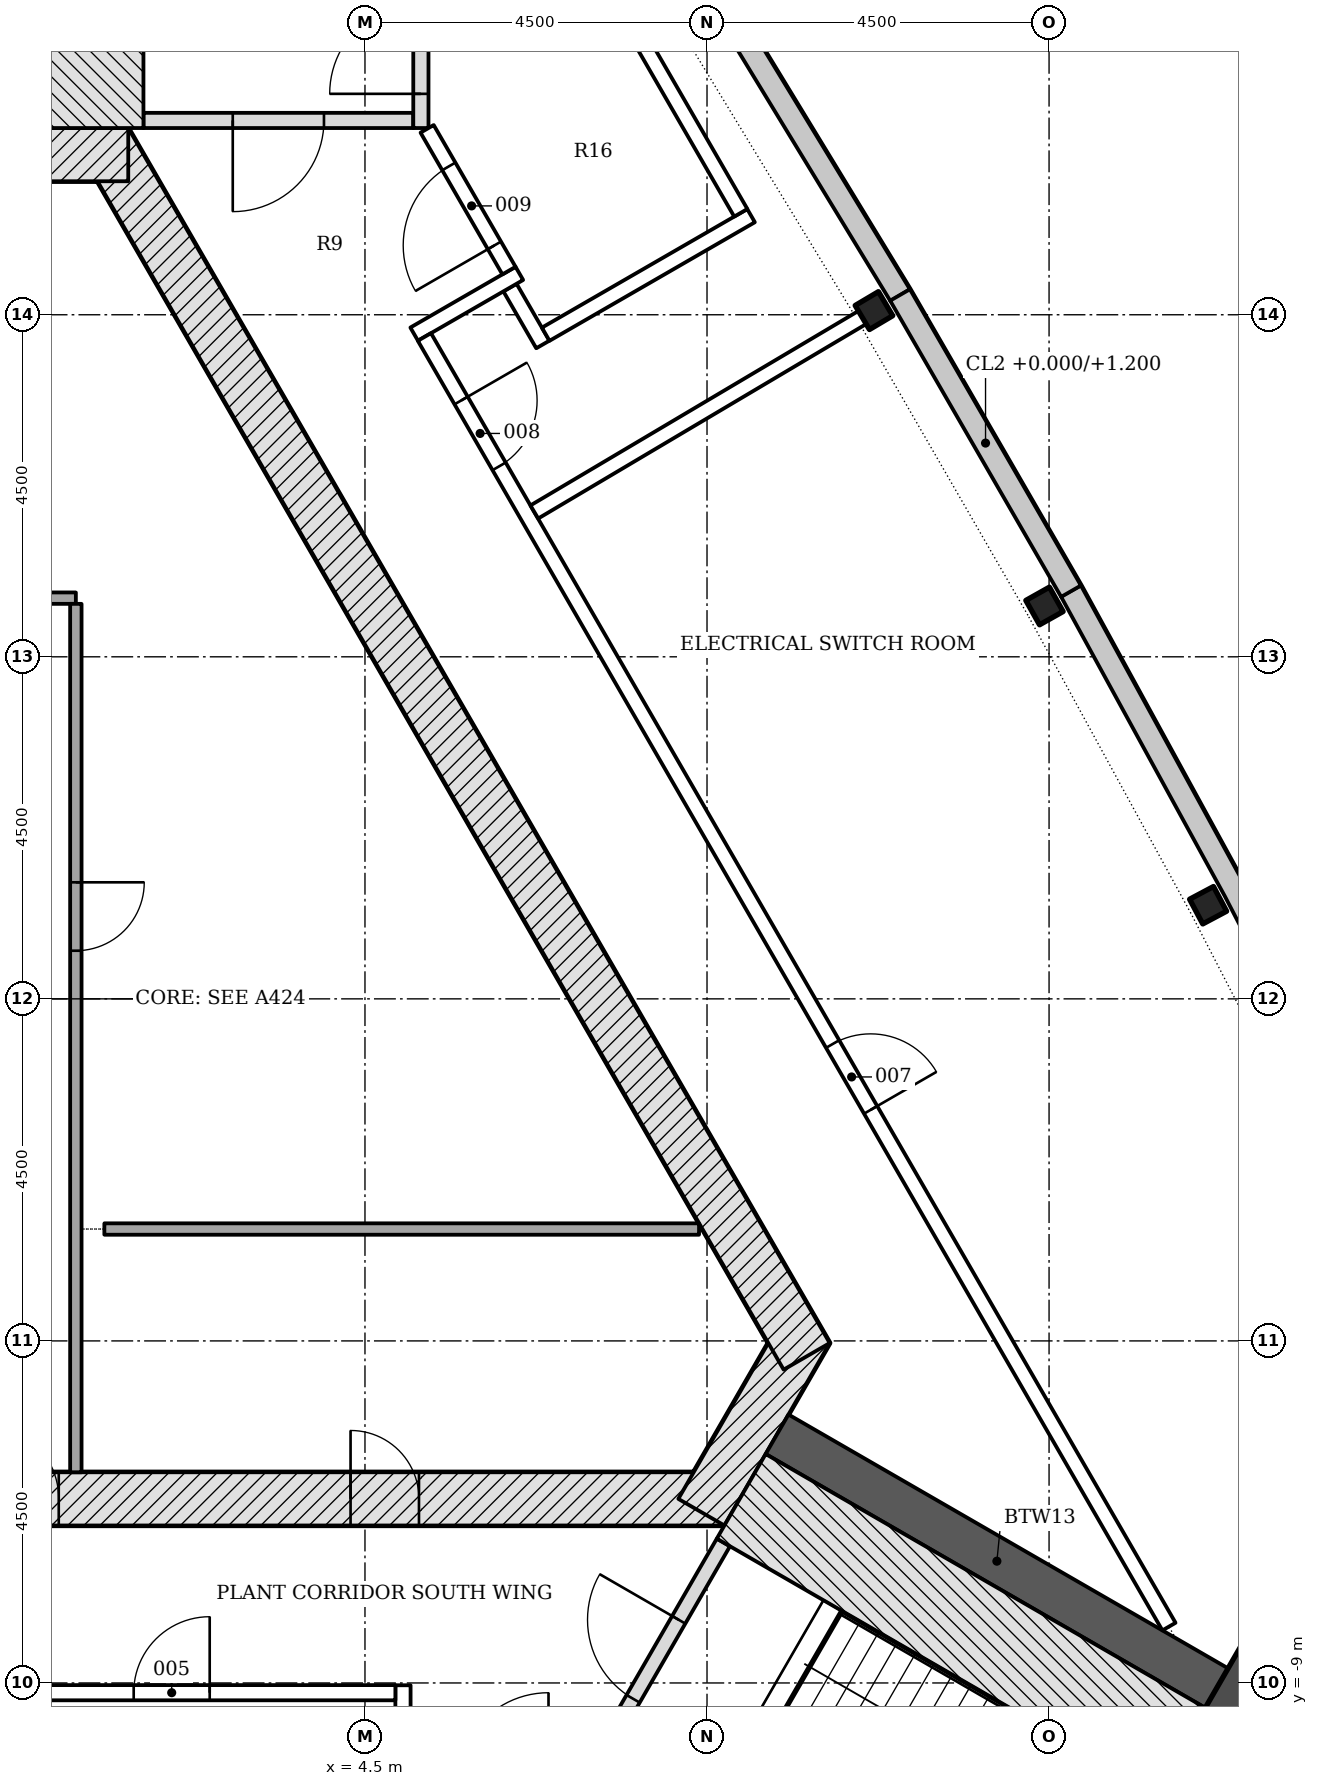
"""IFC4 building model, lengths in metres.
Left out: names, types, materials, properties, quantities, classifications, styles, units other than length and angle.
Written with IfcOpenShell. Run it as: python <this file> out.ifc"""

import sys

from ifc_helpers import new_model, si_unit, direction, frame, frame_2d, origin, origin_2d, place, context, subcontext, project, spatial, polyline, rectangle, i_section, outline, extrude, element, fill, save


model = new_model("IFC4")
c1 = context("Model", 3, precision=1e-05, world=origin(), true_north=direction((0.0, 1.0)))
c2 = subcontext(c1, "Body", "Model", "MODEL_VIEW")
j1 = project(units=[si_unit("LENGTHUNIT", "METRE"), si_unit("PLANEANGLEUNIT", "RADIAN")], contexts=[c1])
p1 = place(None, origin())
s1 = spatial("IfcSite", under=j1, at=p1, CompositionType="ELEMENT")
p2 = place(p1, origin())
s2 = spatial("IfcBuilding", under=s1, at=p2, CompositionType="ELEMENT")
p3 = place(p2, frame((0.0, 0.0, 279.6)))
s3 = spatial("IfcBuildingStorey", under=s2, at=p3, CompositionType="ELEMENT", Elevation=279.6)
p4 = place(p3, frame((-9.229, -6.578, -0.25), z_axis=(0.0, 0.0, 1.0), x_axis=(1.0, 0.0, 0.0)))
e1 = element("IfcWall", 1, at=p4, inside=s3, PredefinedType="SHEAR", context=c2, shape_type="SweptSolid", body=[
    extrude(rectangle(XDim=18.458, YDim=0.7, at=frame_2d((9.229, 0.0))), origin(), (0.0, 0.0, 1.0), 4.5),
])
p5 = place(p4, frame((8.7, 0.0, 0.25)))
e2 = element("IfcOpeningElement", 2, at=p5, cuts=e1, PredefinedType="OPENING", context=c2, shape_type="SweptSolid", body=[
    extrude(rectangle(XDim=1.0, YDim=2.1, at=frame_2d((0.5, 1.05))), frame((0.0, 0.36, 0.0), z_axis=(0.0, -1.0, 0.0), x_axis=(1.0, 0.0, 0.0)), (0.0, 0.0, 1.0), 0.72),
])
p6 = place(p4, frame((3.99, 0.0, 0.25)))
e3 = element("IfcOpeningElement", 3, at=p6, cuts=e1, PredefinedType="OPENING", context=c2, shape_type="SweptSolid", body=[
    extrude(rectangle(XDim=0.9, YDim=2.1, at=frame_2d((0.45, 1.05))), frame((0.0, 0.36, 0.0), z_axis=(0.0, -1.0, 0.0), x_axis=(1.0, 0.0, 0.0)), (0.0, 0.0, 1.0), 0.72),
])
p7 = place(p4, frame((13.539, 0.0, 0.25)))
e4 = element("IfcOpeningElement", 4, at=p7, cuts=e1, PredefinedType="OPENING", context=c2, shape_type="SweptSolid", body=[
    extrude(rectangle(XDim=0.9, YDim=2.1, at=frame_2d((0.45, 1.05))), frame((0.0, 0.36, 0.0), z_axis=(0.0, -1.0, 0.0), x_axis=(1.0, 0.0, 0.0)), (0.0, 0.0, 1.0), 0.72),
])
p8 = place(p3, frame((8.926, -6.753, -0.25), z_axis=(0.0, 0.0, 1.0), x_axis=(0.500042739161, 0.866000726912, 0.0)))
e5 = element("IfcWall", 5, at=p8, inside=s3, PredefinedType="SHEAR", context=c2, shape_type="SweptSolid", body=[
    extrude(rectangle(XDim=2.771, YDim=0.7, at=frame_2d((1.386, 0.0))), origin(), (0.0, 0.0, 1.0), 4.5),
])
p9 = place(p3, frame((10.311, -4.703, -0.25), z_axis=(0.0, 0.0, 1.0), x_axis=(-0.500001446645, 0.866024568562, 0.0)))
e6 = element("IfcWall", 6, at=p9, inside=s3, PredefinedType="SHEAR", context=c2, shape_type="SweptSolid", body=[
    extrude(rectangle(XDim=18.458, YDim=0.7, at=frame_2d((9.229, 0.0))), origin(), (0.0, 0.0, 1.0), 4.5),
])
p10 = place(p3, frame((1.386, 11.106, -0.25), z_axis=(0.0, 0.0, 1.0), x_axis=(-1.0, 0.0, 0.0)))
e7 = element("IfcWall", 7, at=p10, inside=s3, PredefinedType="SHEAR", context=c2, shape_type="SweptSolid", body=[
    extrude(rectangle(XDim=2.771, YDim=0.7, at=frame_2d((1.386, 0.0))), origin(), (0.0, 0.0, 1.0), 4.5),
])
p11 = place(p3, frame((9.922, -5.728, -0.25), z_axis=(0.0, 0.0, 1.0), x_axis=(0.866032176823, -0.499988268569, 0.0)))
e8 = element("IfcWall", 8, at=p11, inside=s3, PredefinedType="SHEAR", context=c2, shape_type="SweptSolid", body=[
    extrude(rectangle(XDim=6.678, YDim=0.6, at=frame_2d((3.339, 0.0))), origin(), (0.0, 0.0, 1.0), 4.5),
])
p12 = place(p3, frame((16.745, -9.667, -0.25), z_axis=(0.0, 0.0, 1.0), x_axis=(0.866025403784, -0.5, 0.0)))
e9 = element("IfcColumn", 9, at=p12, inside=s3, PredefinedType="COLUMN", context=c2, shape_type="SweptSolid", body=[
    extrude(rectangle(XDim=2.4, YDim=2.4, at=origin_2d()), origin(), (0.0, 0.0, 1.0), 4.5),
])
for number, where, z_axis, x_axis in (
    (10, (15.593, 1.232, -0.25), (0.0, 0.0, 1.0), (-0.47, 0.883, 0.0)),
    (11, (13.44, 5.169, -0.25), (0.0, 0.0, 1.0), (-0.49, 0.872, 0.0)),
    (12, (11.196, 9.055, -0.25), (0.0, 0.0, 1.0), (-0.51, 0.86, 0.0)),
):
    element("IfcColumn", number, at=place(p3, frame(where, z_axis=z_axis, x_axis=x_axis)), inside=s3, PredefinedType="COLUMN", context=c2, shape_type="SweptSolid", body=[
        extrude(i_section(OverallWidth=0.368, OverallDepth=0.356, WebThickness=0.011, FlangeThickness=0.018, FilletRadius=0.015, at=origin_2d()), origin(), (0.0, 0.0, 1.0), 4.5),
    ])
p13 = place(p3, origin())
e13 = element("IfcWall", 13, at=p13, inside=s3, PredefinedType="NOTDEFINED", context=c2, shape_type="SweptSolid", body=[
    extrude(outline(polyline([(18.145, -2.507), (16.078, 1.49), (13.919, 5.438), (13.656, 5.294), (15.813, 1.349), (17.878, -2.645), (18.145, -2.507)])), origin(), (0.0, 0.0, 1.0), 4.25),
])
p14 = place(p3, origin())
e14 = element("IfcWall", 14, at=p14, inside=s3, PredefinedType="NOTDEFINED", context=c2, shape_type="SweptSolid", body=[
    extrude(outline(polyline([(11.669, 9.335), (9.33, 13.179), (6.901, 16.968), (6.649, 16.806), (9.075, 13.02), (11.413, 9.179), (11.669, 9.335)])), origin(), (0.0, 0.0, 1.0), 4.25),
])
p15 = place(p3, origin())
e15 = element("IfcWall", 15, at=p15, inside=s3, PredefinedType="NOTDEFINED", context=c2, shape_type="SweptSolid", body=[
    extrude(outline(polyline([(13.919, 5.438), (11.669, 9.335), (11.409, 9.185), (13.659, 5.288), (13.919, 5.438)])), origin(), (0.0, 0.0, 1.0), 1.2),
])
p16 = place(p3, origin())
e16 = element("IfcWall", 16, at=p16, inside=s3, PredefinedType="NOTDEFINED", context=c2, shape_type="SweptSolid", body=[
    extrude(outline(polyline([(11.244, -14.46), (13.211, -14.336), (14.708, -14.069), (16.111, -13.485), (17.355, -12.611), (18.381, -11.49), (19.141, -10.174), (19.599, -8.724), (19.733, -7.21), (19.538, -5.703), (19.021, -4.273), (18.145, -2.507), (17.876, -2.64), (18.745, -4.391), (19.244, -5.774), (19.432, -7.216), (19.303, -8.665), (18.865, -10.052), (18.138, -11.312), (17.156, -12.385), (15.965, -13.22), (14.623, -13.779), (13.176, -14.038), (11.225, -14.161), (11.244, -14.46)])), origin(), (0.0, 0.0, 1.0), 4.25),
])
p17 = place(p3, frame((-0.679, 5.272, 0.0), z_axis=(0.0, 0.0, 1.0), x_axis=(1.0, 0.0, 0.0)))
e17 = element("IfcWall", 17, at=p17, inside=s3, PredefinedType="PARTITIONING", context=c2, shape_type="SweptSolid", body=[
    extrude(rectangle(XDim=1.375, YDim=0.15, at=frame_2d((0.688, 0.0))), origin(), (0.0, 0.0, 1.0), 4.25),
])
p18 = place(p3, frame((0.696, 5.197, 0.0), z_axis=(0.0, 0.0, 1.0), x_axis=(0.0, -1.0, 0.0)))
e18 = element("IfcWall", 18, at=p18, inside=s3, PredefinedType="PARTITIONING", context=c2, shape_type="SweptSolid", body=[
    extrude(rectangle(XDim=11.425, YDim=0.15, at=frame_2d((5.712, 0.0))), origin(), (0.0, 0.0, 1.0), 4.25),
])
p19 = place(p18, frame((3.664, 0.0, 0.0)))
e19 = element("IfcOpeningElement", 19, at=p19, cuts=e18, PredefinedType="OPENING", context=c2, shape_type="SweptSolid", body=[
    extrude(rectangle(XDim=0.9, YDim=2.1, at=frame_2d((0.45, 1.05))), frame((0.0, 0.085, 0.0), z_axis=(0.0, -1.0, 0.0), x_axis=(1.0, 0.0, 0.0)), (0.0, 0.0, 1.0), 0.17),
])
p20 = place(p3, frame((1.071, -3.028, 0.0), z_axis=(0.0, 0.0, 1.0), x_axis=(1.0, 0.0, 0.0)))
e20 = element("IfcWall", 20, at=p20, inside=s3, PredefinedType="PARTITIONING", context=c2, shape_type="SweptSolid", body=[
    extrude(rectangle(XDim=7.824, YDim=0.15, at=frame_2d((3.912, 0.0))), origin(), (0.0, 0.0, 1.0), 4.25),
])
p21 = place(p3, frame((5.135, 11.556, -0.25), z_axis=(0.0, 0.0, 1.0), x_axis=(-1.0, 0.0, 0.0)))
e21 = element("IfcWall", 21, at=p21, inside=s3, PredefinedType="SHEAR", context=c2, shape_type="SweptSolid", body=[
    extrude(rectangle(XDim=3.55, YDim=0.2, at=frame_2d((1.775, 0.0))), origin(), (0.0, 0.0, 1.0), 4.5),
])
p22 = place(p21, frame((1.175, 0.0, 0.25)))
e22 = element("IfcOpeningElement", 22, at=p22, cuts=e21, PredefinedType="OPENING", context=c2, shape_type="SweptSolid", body=[
    extrude(rectangle(XDim=1.2, YDim=2.1, at=frame_2d((0.6, 1.05))), frame((0.0, 0.11, 0.0), z_axis=(0.0, -1.0, 0.0), x_axis=(1.0, 0.0, 0.0)), (0.0, 0.0, 1.0), 0.22),
])
p23 = place(p3, frame((5.236, 11.456, -0.25), z_axis=(0.0, 0.0, 1.0), x_axis=(0.0, 1.0, 0.0)))
e23 = element("IfcWall", 23, at=p23, inside=s3, PredefinedType="SHEAR", context=c2, shape_type="SweptSolid", body=[
    extrude(rectangle(XDim=5.6, YDim=0.2, at=frame_2d((2.8, 0.0))), origin(), (0.0, 0.0, 1.0), 4.5),
])
p24 = place(p23, frame((0.45, 0.0, 0.25)))
e24 = element("IfcOpeningElement", 24, at=p24, cuts=e23, PredefinedType="OPENING", context=c2, shape_type="SweptSolid", body=[
    extrude(rectangle(XDim=1.2, YDim=2.1, at=frame_2d((0.6, 1.05))), frame((0.0, 0.11, 0.0), z_axis=(0.0, -1.0, 0.0), x_axis=(1.0, 0.0, 0.0)), (0.0, 0.0, 1.0), 0.22),
])
p25 = place(p3, frame((0.943, 11.456, -0.25), z_axis=(0.0, 0.0, 1.0), x_axis=(0.0, 1.0, 0.0)))
e25 = element("IfcWall", 25, at=p25, inside=s3, PredefinedType="SHEAR", context=c2, shape_type="SweptSolid", body=[
    extrude(rectangle(XDim=6.679, YDim=1.286, at=frame_2d((3.339, 0.0))), origin(), (0.0, 0.0, 1.0), 4.5),
])
p26 = place(p3, frame((7.44, -10.226, -0.25), z_axis=(0.0, 0.0, 1.0), x_axis=(0.500022077904, 0.866012656725, 0.0)))
e26 = element("IfcWall", 26, at=p26, inside=s3, PredefinedType="SHEAR", context=c2, shape_type="SweptSolid", body=[
    extrude(rectangle(XDim=3.55, YDim=0.2, at=frame_2d((1.775, 0.0))), origin(), (0.0, 0.0, 1.0), 4.5),
])
p27 = place(p26, frame((1.175, 0.0, 0.25)))
e27 = element("IfcOpeningElement", 27, at=p27, cuts=e26, PredefinedType="OPENING", context=c2, shape_type="SweptSolid", body=[
    extrude(rectangle(XDim=1.2, YDim=2.1, at=frame_2d((0.6, 1.05))), frame((0.0, 0.11, 0.0), z_axis=(0.0, -1.0, 0.0), x_axis=(1.0, 0.0, 0.0)), (0.0, 0.0, 1.0), 0.22),
])
p28 = place(p3, frame((9.45, -6.545, -0.25), z_axis=(0.0, 0.0, 1.0), x_axis=(0.866016347338, -0.500015685897, 0.0)))
e28 = element("IfcWall", 28, at=p28, inside=s3, PredefinedType="SHEAR", context=c2, shape_type="SweptSolid", body=[
    extrude(rectangle(XDim=6.678, YDim=1.286, at=frame_2d((3.339, 0.0))), origin(), (0.0, 0.0, 1.0), 4.5),
])
p29 = place(p3, frame((5.0, -10.428, 0.0), z_axis=(0.0, 0.0, 1.0), x_axis=(0.0, 1.0, 0.0)))
e29 = element("IfcWall", 29, at=p29, inside=s3, PredefinedType="PARTITIONING", context=c2, shape_type="SweptSolid", body=[
    extrude(rectangle(XDim=1.398, YDim=0.2, at=frame_2d((0.699, 0.0))), origin(), (0.0, 0.0, 1.0), 4.25),
])
p30 = place(p3, frame((-15.037, -9.128, 0.0), z_axis=(0.0, 0.0, 1.0), x_axis=(1.0, 0.0, 0.0)))
e30 = element("IfcWall", 30, at=p30, inside=s3, PredefinedType="PARTITIONING", context=c2, shape_type="SweptSolid", body=[
    extrude(rectangle(XDim=19.937, YDim=0.2, at=frame_2d((9.969, 0.0))), origin(), (0.0, 0.0, 1.0), 3.702),
])
p31 = place(p30, frame((5.84, 0.0, 0.0)))
e31 = element("IfcOpeningElement", 31, at=p31, cuts=e30, PredefinedType="OPENING", context=c2, shape_type="SweptSolid", body=[
    extrude(rectangle(XDim=1.0, YDim=2.1, at=frame_2d((0.5, 1.05))), frame((0.0, 0.11, 0.0), z_axis=(0.0, -1.0, 0.0), x_axis=(1.0, 0.0, 0.0)), (0.0, 0.0, 1.0), 0.22),
])
p32 = place(p30, frame((16.495, 0.0, 0.0)))
e32 = element("IfcOpeningElement", 32, at=p32, cuts=e30, PredefinedType="OPENING", context=c2, shape_type="SweptSolid", body=[
    extrude(rectangle(XDim=1.0, YDim=2.1, at=frame_2d((0.5, 1.05))), frame((0.0, 0.11, 0.0), z_axis=(0.0, -1.0, 0.0), x_axis=(1.0, 0.0, 0.0)), (0.0, 0.0, 1.0), 0.22),
])
p33 = place(p3, frame((6.408, 9.358, 0.0), z_axis=(0.0, 0.0, 1.0), x_axis=(0.49996696679, -0.866044474677, 0.0)))
e33 = element("IfcWall", 33, at=p33, inside=s3, PredefinedType="PARTITIONING", context=c2, shape_type="SweptSolid", body=[
    extrude(rectangle(XDim=0.864, YDim=0.2, at=frame_2d((0.432, 0.0))), origin(), (0.0, 0.0, 1.0), 4.25),
])
p34 = place(p3, frame((5.147, 8.745, 0.0), z_axis=(0.0, 0.0, 1.0), x_axis=(0.865987117328, 0.500066308224, 0.0)))
e34 = element("IfcWall", 34, at=p34, inside=s3, PredefinedType="PARTITIONING", context=c2, shape_type="SweptSolid", body=[
    extrude(rectangle(XDim=1.598, YDim=0.2, at=frame_2d((0.799, 0.0))), origin(), (0.0, 0.0, 1.0), 4.25),
])
p35 = place(p3, frame((6.395, 9.581, 0.0), z_axis=(0.0, 0.0, 1.0), x_axis=(-0.500003735859, 0.866023246874, 0.0)))
e35 = element("IfcWall", 35, at=p35, inside=s3, PredefinedType="PARTITIONING", context=c2, shape_type="SweptSolid", body=[
    extrude(rectangle(XDim=2.154, YDim=0.2, at=frame_2d((1.077, 0.0))), origin(), (0.0, 0.0, 1.0), 3.702),
])
p36 = place(p35, frame((0.383, 0.0, 0.0)))
e36 = element("IfcOpeningElement", 36, at=p36, cuts=e35, PredefinedType="OPENING", context=c2, shape_type="SweptSolid", body=[
    extrude(rectangle(XDim=1.2, YDim=2.1, at=frame_2d((0.6, 1.05))), frame((0.0, 0.11, 0.0), z_axis=(0.0, -1.0, 0.0), x_axis=(1.0, 0.0, 0.0)), (0.0, 0.0, 1.0), 0.22),
])
p37 = place(p3, frame((5.282, 8.708, 0.0), z_axis=(0.0, 0.0, 1.0), x_axis=(0.500001848211, -0.866024336717, 0.0)))
e37 = element("IfcWall", 37, at=p37, inside=s3, PredefinedType="PARTITIONING", context=c2, shape_type="SweptSolid", body=[
    extrude(rectangle(XDim=19.591, YDim=0.2, at=frame_2d((9.795, 0.0))), origin(), (0.0, 0.0, 1.0), 3.702),
])
p38 = place(p37, frame((10.741, 0.0, 0.0)))
e38 = element("IfcOpeningElement", 38, at=p38, cuts=e37, PredefinedType="OPENING", context=c2, shape_type="SweptSolid", body=[
    extrude(rectangle(XDim=1.0, YDim=2.1, at=frame_2d((0.5, 1.05))), frame((0.0, 0.11, 0.0), z_axis=(0.0, -1.0, 0.0), x_axis=(1.0, 0.0, 0.0)), (0.0, 0.0, 1.0), 0.22),
])
p39 = place(p37, frame((0.965, 0.0, 0.0)))
e39 = element("IfcOpeningElement", 39, at=p39, cuts=e37, PredefinedType="OPENING", context=c2, shape_type="SweptSolid", body=[
    extrude(rectangle(XDim=1.0, YDim=2.1, at=frame_2d((0.5, 1.05))), frame((0.0, 0.11, 0.0), z_axis=(0.0, -1.0, 0.0), x_axis=(1.0, 0.0, 0.0)), (0.0, 0.0, 1.0), 0.22),
])
p40 = place(p3, frame((6.728, 6.406, 0.0), z_axis=(0.0, 0.0, 1.0), x_axis=(0.860154706705, 0.510033215128, 0.0)))
e40 = element("IfcWall", 40, at=p40, inside=s3, PredefinedType="PARTITIONING", context=c2, shape_type="SweptSolid", body=[
    extrude(rectangle(XDim=5.044, YDim=0.2, at=frame_2d((2.522, 0.0))), origin(), (0.0, 0.0, 1.0), 3.702),
])
p41 = place(p3, frame((6.878, 8.744, 0.0), z_axis=(0.0, 0.0, 1.0), x_axis=(0.866023983177, 0.500002460556, 0.0)))
e41 = element("IfcWall", 41, at=p41, inside=s3, PredefinedType="PARTITIONING", context=c2, shape_type="SweptSolid", body=[
    extrude(rectangle(XDim=3.12, YDim=0.2, at=frame_2d((1.56, 0.0))), origin(), (0.0, 0.0, 1.0), 4.25),
])
p42 = place(p3, frame((6.566, 15.327, 0.0), z_axis=(0.0, 0.0, 1.0), x_axis=(0.499997778408, -0.866026686418, 0.0)))
e42 = element("IfcWall", 42, at=p42, inside=s3, PredefinedType="PARTITIONING", context=c2, shape_type="SweptSolid", body=[
    extrude(rectangle(XDim=5.757, YDim=0.2, at=frame_2d((2.878, 0.0))), origin(), (0.0, 0.0, 1.0), 3.702),
])
p43 = place(p5, origin())
e43 = element("IfcDoor", 43, at=p43, inside=s3, OperationType="SINGLE_SWING_LEFT", PredefinedType="DOOR", context=c2, shape_type="SweptSolid", body=[
    extrude(rectangle(XDim=1.0, YDim=2.1, at=frame_2d((0.5, 1.05))), frame((0.0, 0.075, 0.0), z_axis=(0.0, -1.0, 0.0), x_axis=(1.0, 0.0, 0.0)), (0.0, 0.0, 1.0), 0.15),
])
fill(e2, e43)
p44 = place(p7, origin())
e44 = element("IfcDoor", 44, at=p44, inside=s3, OperationType="SINGLE_SWING_LEFT", PredefinedType="DOOR", context=c2, shape_type="SweptSolid", body=[
    extrude(rectangle(XDim=0.9, YDim=2.1, at=frame_2d((0.45, 1.05))), frame((0.0, 0.075, 0.0), z_axis=(0.0, -1.0, 0.0), x_axis=(1.0, 0.0, 0.0)), (0.0, 0.0, 1.0), 0.15),
])
fill(e4, e44)
p45 = place(p19, origin())
e45 = element("IfcDoor", 45, at=p45, inside=s3, OperationType="SINGLE_SWING_LEFT", PredefinedType="DOOR", context=c2, shape_type="SweptSolid", body=[
    extrude(rectangle(XDim=0.9, YDim=2.1, at=frame_2d((0.45, 1.05))), frame((0.0, 0.025, 0.0), z_axis=(0.0, -1.0, 0.0), x_axis=(1.0, 0.0, 0.0)), (0.0, 0.0, 1.0), 0.05),
])
fill(e19, e45)
p46 = place(p22, origin())
e46 = element("IfcDoor", 46, at=p46, inside=s3, OperationType="SINGLE_SWING_RIGHT", PredefinedType="DOOR", context=c2, shape_type="SweptSolid", body=[
    extrude(rectangle(XDim=1.2, YDim=2.1, at=frame_2d((0.6, 1.05))), frame((0.0, 0.025, 0.0), z_axis=(0.0, -1.0, 0.0), x_axis=(1.0, 0.0, 0.0)), (0.0, 0.0, 1.0), 0.05),
])
fill(e22, e46)
p47 = place(p24, origin())
e47 = element("IfcDoor", 47, at=p47, inside=s3, OperationType="SINGLE_SWING_LEFT", PredefinedType="DOOR", context=c2, shape_type="SweptSolid", body=[
    extrude(rectangle(XDim=1.2, YDim=2.1, at=frame_2d((0.6, 1.05))), frame((0.0, 0.025, 0.0), z_axis=(0.0, -1.0, 0.0), x_axis=(1.0, 0.0, 0.0)), (0.0, 0.0, 1.0), 0.05),
])
fill(e24, e47)
p48 = place(p27, origin())
e48 = element("IfcDoor", 48, at=p48, inside=s3, OperationType="SINGLE_SWING_RIGHT", PredefinedType="DOOR", context=c2, shape_type="SweptSolid", body=[
    extrude(rectangle(XDim=1.2, YDim=2.1, at=frame_2d((0.6, 1.05))), frame((0.0, 0.025, 0.0), z_axis=(0.0, -1.0, 0.0), x_axis=(1.0, 0.0, 0.0)), (0.0, 0.0, 1.0), 0.05),
])
fill(e27, e48)
p49 = place(p32, origin())
e49 = element("IfcDoor", 49, at=p49, inside=s3, OperationType="SINGLE_SWING_RIGHT", PredefinedType="DOOR", context=c2, shape_type="SweptSolid", body=[
    extrude(rectangle(XDim=1.0, YDim=2.1, at=frame_2d((0.5, 1.05))), frame((0.0, 0.025, 0.0), z_axis=(0.0, -1.0, 0.0), x_axis=(1.0, 0.0, 0.0)), (0.0, 0.0, 1.0), 0.05),
])
fill(e32, e49)
p50 = place(p38, origin())
e50 = element("IfcDoor", 50, at=p50, inside=s3, OperationType="SINGLE_SWING_RIGHT", PredefinedType="DOOR", context=c2, shape_type="SweptSolid", body=[
    extrude(rectangle(XDim=1.0, YDim=2.1, at=frame_2d((0.5, 1.05))), frame((0.0, 0.025, 0.0), z_axis=(0.0, -1.0, 0.0), x_axis=(1.0, 0.0, 0.0)), (0.0, 0.0, 1.0), 0.05),
])
fill(e38, e50)
p51 = place(p39, origin())
e51 = element("IfcDoor", 51, at=p51, inside=s3, OperationType="SINGLE_SWING_LEFT", PredefinedType="DOOR", context=c2, shape_type="SweptSolid", body=[
    extrude(rectangle(XDim=1.0, YDim=2.1, at=frame_2d((0.5, 1.05))), frame((0.0, 0.025, 0.0), z_axis=(0.0, -1.0, 0.0), x_axis=(1.0, 0.0, 0.0)), (0.0, 0.0, 1.0), 0.05),
])
fill(e39, e51)
p52 = place(p36, origin())
e52 = element("IfcDoor", 52, at=p52, inside=s3, OperationType="SINGLE_SWING_LEFT", PredefinedType="DOOR", context=c2, shape_type="SweptSolid", body=[
    extrude(rectangle(XDim=1.2, YDim=2.1, at=frame_2d((0.6, 1.05))), frame((0.0, 0.025, 0.0), z_axis=(0.0, -1.0, 0.0), x_axis=(1.0, 0.0, 0.0)), (0.0, 0.0, 1.0), 0.05),
])
fill(e36, e52)
save(model, sys.argv[1])
